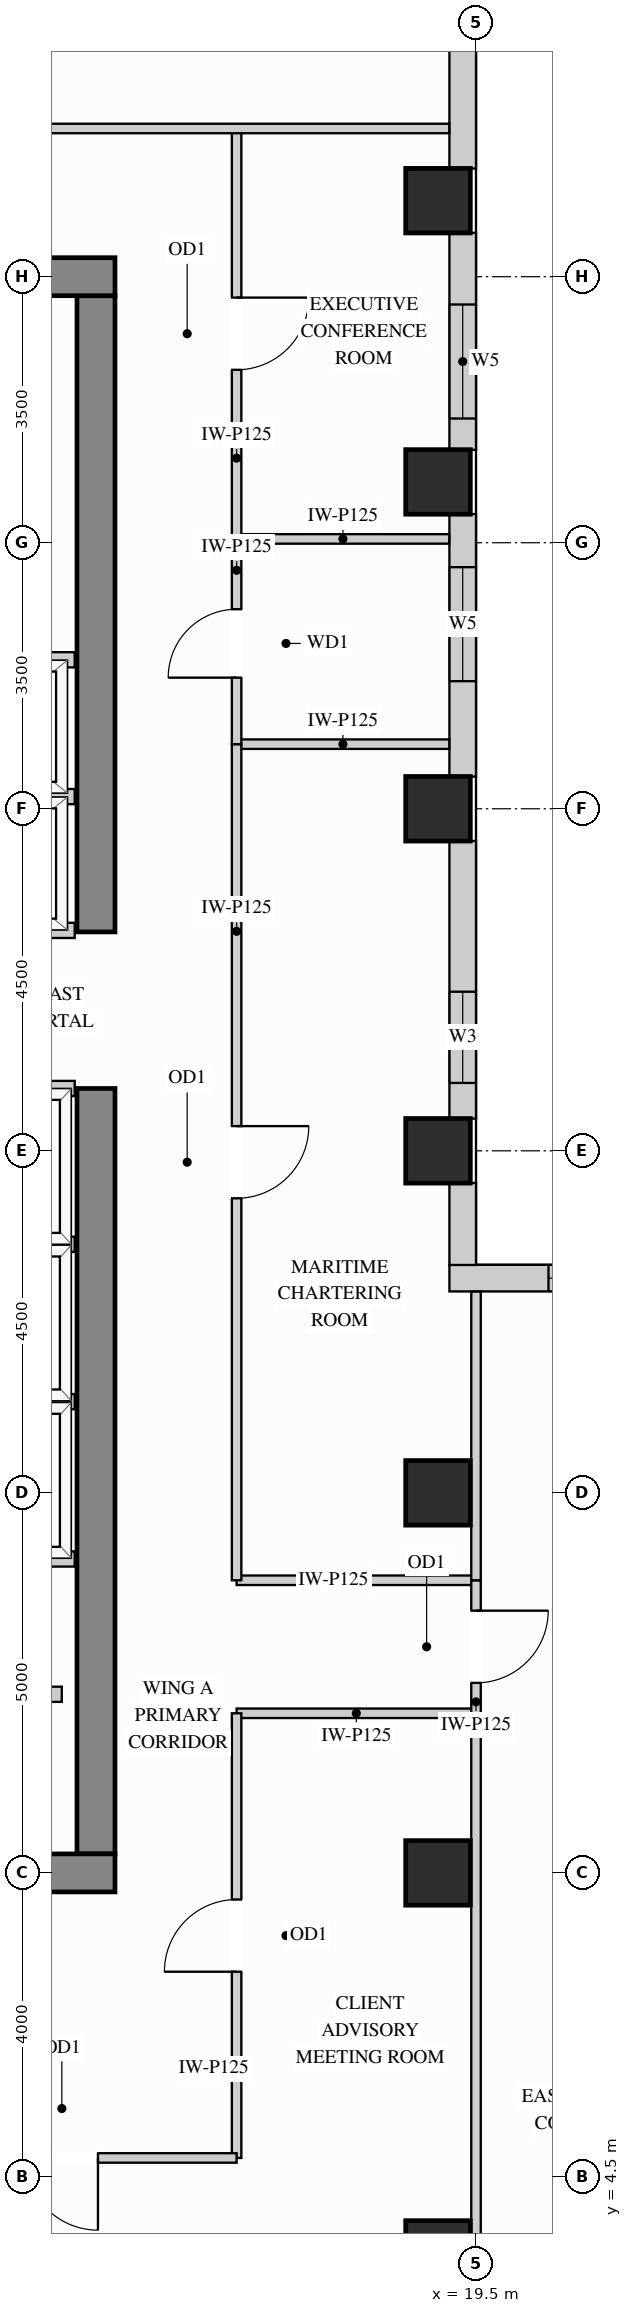
"""IFC4 building model, lengths in metres.
Left out: names, types, materials, properties, quantities, classifications, styles, units other than length and angle.
Written with IfcOpenShell. Run it as: python <this file> out.ifc"""

import sys

from ifc_helpers import new_model, si_unit, direction, frame, frame_2d, origin, origin_2d, place, context, subcontext, project, spatial, rectangle, extrude, source, transform, mapped, element, fill, save


model = new_model("IFC4")
c1 = context("Model", 3, precision=1e-05, world=origin(), true_north=direction((0.0, 1.0)))
c2 = subcontext(c1, "Body", "Model", "MODEL_VIEW")
j1 = project(units=[si_unit("LENGTHUNIT", "METRE"), si_unit("PLANEANGLEUNIT", "RADIAN")], contexts=[c1])
p1 = place(None, origin())
s1 = spatial("IfcSite", under=j1, at=p1, CompositionType="ELEMENT")
p2 = place(p1, origin())
s2 = spatial("IfcBuilding", under=s1, at=p2, CompositionType="ELEMENT")
p3 = place(p2, frame((0.0, 0.0, 270.0)))
s3 = spatial("IfcBuildingStorey", under=s2, at=p3, CompositionType="ELEMENT", Elevation=270.0)
m1 = source(origin(), c2, "Body", "SweptSolid", [
    extrude(rectangle(XDim=0.85, YDim=0.85, at=origin_2d()), origin(), (0.0, 0.0, 1.0), 3.4),
])
for number, where, z_axis, x_axis in (
    (1, (19.0, 13.5, 0.0), (0.0, 0.0, 1.0), (1.0, 0.0, 0.0)),
    (2, (19.0, 18.0, 0.0), (0.0, 0.0, 1.0), (1.0, 0.0, 0.0)),
    (3, (19.0, 22.5, 0.0), (0.0, 0.0, 1.0), (1.0, 0.0, 0.0)),
    (4, (19.0, 26.8, 0.0), (0.0, 0.0, 1.0), (1.0, 0.0, 0.0)),
    (5, (19.0, 30.5, 0.0), (0.0, 0.0, 1.0), (1.0, 0.0, 0.0)),
    (6, (19.0, 3.5, 0.0), (0.0, 0.0, 1.0), (1.0, 0.0, 0.0)),
    (7, (19.0, 8.5, 0.0), (0.0, 0.0, 1.0), (1.0, 0.0, 0.0)),
):
    element("IfcColumn", number, at=place(p3, frame(where, z_axis=z_axis, x_axis=x_axis)), inside=s3, PredefinedType="COLUMN", context=c2, shape_type="MappedRepresentation", body=[
        mapped(m1, transform((0.0, 0.0, 0.0), x_axis=(1.0, 0.0, 0.0), y_axis=(0.0, 1.0, 0.0), z_axis=(0.0, 0.0, 1.0))),
    ])
m2 = source(origin(), c2, "Body", "SweptSolid", [
    extrude(rectangle(XDim=10.07, YDim=0.5, at=frame_2d((5.035, 0.0))), origin(), (0.0, 0.0, 1.0), 3.4),
])
p4 = place(p3, frame((14.5, 8.75, 0.0), z_axis=(0.0, 0.0, 1.0), x_axis=(0.0, 1.0, 0.0)))
e8 = element("IfcWall", 8, at=p4, inside=s3, PredefinedType="SHEAR", context=c2, shape_type="MappedRepresentation", body=[
    mapped(m2, transform((0.0, 0.0, 0.0), x_axis=(1.0, 0.0, 0.0), y_axis=(0.0, 1.0, 0.0), z_axis=(0.0, 0.0, 1.0))),
])
m3 = source(origin(), c2, "Body", "SweptSolid", [
    extrude(rectangle(XDim=8.37, YDim=0.5, at=frame_2d((4.185, 0.0))), origin(), (0.0, 0.0, 1.0), 3.4),
])
p5 = place(p3, frame((14.5, 20.88, 0.0), z_axis=(0.0, 0.0, 1.0), x_axis=(0.0, 1.0, 0.0)))
e9 = element("IfcWall", 9, at=p5, inside=s3, PredefinedType="SHEAR", context=c2, shape_type="MappedRepresentation", body=[
    mapped(m3, transform((0.0, 0.0, 0.0), x_axis=(1.0, 0.0, 0.0), y_axis=(0.0, 1.0, 0.0), z_axis=(0.0, 0.0, 1.0))),
])
m4 = source(origin(), c2, "Body", "SweptSolid", [
    extrude(rectangle(XDim=10.5, YDim=0.5, at=frame_2d((5.25, 0.0))), origin(), (0.0, 0.0, 1.0), 3.4),
])
for number, where, z_axis, x_axis in (
    (10, (4.25, 29.5, 0.0), (0.0, 0.0, 1.0), (1.0, 0.0, 0.0)),
    (11, (4.25, 8.5, 0.0), (0.0, 0.0, 1.0), (1.0, 0.0, 0.0)),
):
    element("IfcWall", number, at=place(p3, frame(where, z_axis=z_axis, x_axis=x_axis)), inside=s3, PredefinedType="SHEAR", context=c2, shape_type="MappedRepresentation", body=[
        mapped(m4, transform((0.0, 0.0, 0.0), x_axis=(1.0, 0.0, 0.0), y_axis=(0.0, 1.0, 0.0), z_axis=(0.0, 0.0, 1.0))),
    ])
p6 = place(p3, frame((22.977, 16.325, 0.0), z_axis=(0.0, 0.0, 1.0), x_axis=(-1.0, 0.0, 0.0)))
e12 = element("IfcWall", 12, at=p6, inside=s3, PredefinedType="SOLIDWALL", context=c2, shape_type="SweptSolid", body=[
    extrude(rectangle(XDim=3.827, YDim=0.35, at=frame_2d((1.914, 0.0))), origin(), (0.0, 0.0, 1.0), 3.385),
])
p7 = place(p6, frame((1.023, 0.0, 0.78)))
e13 = element("IfcOpeningElement", 13, at=p7, cuts=e12, PredefinedType="OPENING", context=c2, shape_type="SweptSolid", body=[
    extrude(rectangle(XDim=1.5, YDim=2.0, at=frame_2d((0.75, 1.0))), frame((0.0, 0.185, 0.0), z_axis=(0.0, -1.0, 0.0), x_axis=(1.0, 0.0, 0.0)), (0.0, 0.0, 1.0), 0.37),
])
m5 = source(origin(), c2, "Body", "SweptSolid", [
    extrude(rectangle(XDim=1.079, YDim=0.35, at=frame_2d((0.54, 0.0))), origin(), (0.0, 0.0, 1.0), 2.619),
])
p8 = place(p3, frame((19.325, 16.498, 0.0), z_axis=(0.0, 0.0, 1.0), x_axis=(0.0, 1.0, 0.0)))
e14 = element("IfcWall", 14, at=p8, inside=s3, PredefinedType="SOLIDWALL", context=c2, shape_type="MappedRepresentation", body=[
    mapped(m5, transform((0.0, 0.0, 0.0), x_axis=(1.0, 0.0, 0.0), y_axis=(0.0, 1.0, 0.0), z_axis=(0.0, 0.0, 1.0))),
])
p9 = place(p3, frame((19.325, 18.423, 0.0), z_axis=(0.0, 0.0, 1.0), x_axis=(0.0, 1.0, 0.0)))
e15 = element("IfcWall", 15, at=p9, inside=s3, PredefinedType="SOLIDWALL", context=c2, shape_type="SweptSolid", body=[
    extrude(rectangle(XDim=3.654, YDim=0.35, at=frame_2d((1.827, 0.0))), origin(), (0.0, 0.0, 1.0), 2.619),
])
p10 = place(p9, frame((0.47, 0.0, 0.78)))
e16 = element("IfcOpeningElement", 16, at=p10, cuts=e15, PredefinedType="OPENING", context=c2, shape_type="SweptSolid", body=[
    extrude(rectangle(XDim=1.2, YDim=1.659, at=frame_2d((0.6, 0.83))), frame((0.0, 0.185, 0.0), z_axis=(0.0, -1.0, 0.0), x_axis=(1.0, 0.0, 0.0)), (0.0, 0.0, 1.0), 0.37),
])
p11 = place(p3, frame((19.325, 22.923, 0.0), z_axis=(0.0, 0.0, 1.0), x_axis=(0.0, 1.0, 0.0)))
e17 = element("IfcWall", 17, at=p11, inside=s3, PredefinedType="SOLIDWALL", context=c2, shape_type="SweptSolid", body=[
    extrude(rectangle(XDim=3.454, YDim=0.35, at=frame_2d((1.727, 0.0))), origin(), (0.0, 0.0, 1.0), 2.619),
])
p12 = place(p11, frame((1.256, 0.0, 0.78)))
e18 = element("IfcOpeningElement", 18, at=p12, cuts=e17, PredefinedType="OPENING", context=c2, shape_type="SweptSolid", body=[
    extrude(rectangle(XDim=1.5, YDim=1.659, at=frame_2d((0.75, 0.83))), frame((0.0, 0.185, 0.0), z_axis=(0.0, -1.0, 0.0), x_axis=(1.0, 0.0, 0.0)), (0.0, 0.0, 1.0), 0.37),
])
p13 = place(p3, frame((19.325, 27.223, 0.0), z_axis=(0.0, 0.0, 1.0), x_axis=(0.0, 1.0, 0.0)))
e19 = element("IfcWall", 19, at=p13, inside=s3, PredefinedType="SOLIDWALL", context=c2, shape_type="SweptSolid", body=[
    extrude(rectangle(XDim=2.854, YDim=0.35, at=frame_2d((1.427, 0.0))), origin(), (0.0, 0.0, 1.0), 2.619),
])
p14 = place(p13, frame((0.411, 0.0, 0.78)))
e20 = element("IfcOpeningElement", 20, at=p14, cuts=e19, PredefinedType="OPENING", context=c2, shape_type="SweptSolid", body=[
    extrude(rectangle(XDim=1.5, YDim=1.659, at=frame_2d((0.75, 0.83))), frame((0.0, 0.185, 0.0), z_axis=(0.0, -1.0, 0.0), x_axis=(1.0, 0.0, 0.0)), (0.0, 0.0, 1.0), 0.37),
])
m6 = source(origin(), c2, "Body", "SweptSolid", [
    extrude(rectangle(XDim=3.654, YDim=0.35, at=frame_2d((1.827, 0.0))), origin(), (0.0, 0.0, 1.0), 2.619),
])
p15 = place(p3, frame((19.325, 30.923, 0.0), z_axis=(0.0, 0.0, 1.0), x_axis=(0.0, 1.0, 0.0)))
e21 = element("IfcWall", 21, at=p15, inside=s3, PredefinedType="SOLIDWALL", context=c2, shape_type="MappedRepresentation", body=[
    mapped(m6, transform((0.0, 0.0, 0.0), x_axis=(1.0, 0.0, 0.0), y_axis=(0.0, 1.0, 0.0), z_axis=(0.0, 0.0, 1.0))),
])
m7 = source(origin(), c2, "Body", "SweptSolid", [
    extrude(rectangle(XDim=2.798, YDim=0.125, at=frame_2d((1.399, 0.0))), origin(), (0.0, 0.0, 1.0), 3.385),
])
for number, where, z_axis, x_axis in (
    (22, (16.35, 23.35, 0.0), (0.0, 0.0, 1.0), (1.0, 0.0, 0.0)),
    (23, (16.35, 26.05, 0.0), (0.0, 0.0, 1.0), (1.0, 0.0, 0.0)),
):
    element("IfcWall", number, at=place(p3, frame(where, z_axis=z_axis, x_axis=x_axis)), inside=s3, PredefinedType="PARTITIONING", context=c2, shape_type="MappedRepresentation", body=[
        mapped(m7, transform((0.0, 0.0, 0.0), x_axis=(1.0, 0.0, 0.0), y_axis=(0.0, 1.0, 0.0), z_axis=(0.0, 0.0, 1.0))),
    ])
m8 = source(origin(), c2, "Body", "SweptSolid", [
    extrude(rectangle(XDim=3.15, YDim=0.125, at=frame_2d((1.575, 0.0))), origin(), (0.0, 0.0, 1.0), 3.385),
])
for number, where, z_axis, x_axis in (
    (24, (16.35, 12.35, 0.0), (0.0, 0.0, 1.0), (1.0, 0.0, 0.0)),
    (25, (16.35, 10.6, 0.0), (0.0, 0.0, 1.0), (1.0, 0.0, 0.0)),
):
    element("IfcWall", number, at=place(p3, frame(where, z_axis=z_axis, x_axis=x_axis)), inside=s3, PredefinedType="PARTITIONING", context=c2, shape_type="MappedRepresentation", body=[
        mapped(m8, transform((0.0, 0.0, 0.0), x_axis=(1.0, 0.0, 0.0), y_axis=(0.0, 1.0, 0.0), z_axis=(0.0, 0.0, 1.0))),
    ])
p16 = place(p3, frame((16.35, 4.75, 0.0), z_axis=(0.0, 0.0, 1.0), x_axis=(0.0, 1.0, 0.0)))
e26 = element("IfcWall", 26, at=p16, inside=s3, PredefinedType="PARTITIONING", context=c2, shape_type="SweptSolid", body=[
    extrude(rectangle(XDim=5.85, YDim=0.125, at=frame_2d((2.925, 0.0))), origin(), (0.0, 0.0, 1.0), 3.385),
])
p17 = place(p16, frame((2.45, 0.0, 0.0)))
e27 = element("IfcOpeningElement", 27, at=p17, cuts=e26, PredefinedType="OPENING", context=c2, shape_type="SweptSolid", body=[
    extrude(rectangle(XDim=0.95, YDim=2.15, at=frame_2d((0.475, 1.075))), frame((0.0, 0.073, 0.0), z_axis=(0.0, -1.0, 0.0), x_axis=(1.0, 0.0, 0.0)), (0.0, 0.0, 1.0), 0.145),
])
p18 = place(p3, frame((16.35, 12.35, 0.0), z_axis=(0.0, 0.0, 1.0), x_axis=(0.0, 1.0, 0.0)))
e28 = element("IfcWall", 28, at=p18, inside=s3, PredefinedType="PARTITIONING", context=c2, shape_type="SweptSolid", body=[
    extrude(rectangle(XDim=11.0, YDim=0.125, at=frame_2d((5.5, 0.0))), origin(), (0.0, 0.0, 1.0), 3.385),
])
p19 = place(p18, frame((5.025, 0.0, 0.0)))
e29 = element("IfcOpeningElement", 29, at=p19, cuts=e28, PredefinedType="OPENING", context=c2, shape_type="SweptSolid", body=[
    extrude(rectangle(XDim=0.95, YDim=2.15, at=frame_2d((0.475, 1.075))), frame((0.0, 0.073, 0.0), z_axis=(0.0, -1.0, 0.0), x_axis=(1.0, 0.0, 0.0)), (0.0, 0.0, 1.0), 0.145),
])
p20 = place(p3, frame((16.35, 26.05, 0.0), z_axis=(0.0, 0.0, 1.0), x_axis=(0.0, 1.0, 0.0)))
e30 = element("IfcWall", 30, at=p20, inside=s3, PredefinedType="PARTITIONING", context=c2, shape_type="SweptSolid", body=[
    extrude(rectangle(XDim=5.4, YDim=0.125, at=frame_2d((2.7, 0.0))), origin(), (0.0, 0.0, 1.0), 3.385),
])
p21 = place(p20, frame((2.225, 0.0, 0.0)))
e31 = element("IfcOpeningElement", 31, at=p21, cuts=e30, PredefinedType="OPENING", context=c2, shape_type="SweptSolid", body=[
    extrude(rectangle(XDim=0.95, YDim=2.15, at=frame_2d((0.475, 1.075))), frame((0.0, 0.073, 0.0), z_axis=(0.0, -1.0, 0.0), x_axis=(1.0, 0.0, 0.0)), (0.0, 0.0, 1.0), 0.145),
])
p22 = place(p3, frame((16.35, 23.35, 0.0), z_axis=(0.0, 0.0, 1.0), x_axis=(0.0, 1.0, 0.0)))
e32 = element("IfcWall", 32, at=p22, inside=s3, PredefinedType="PARTITIONING", context=c2, shape_type="SweptSolid", body=[
    extrude(rectangle(XDim=2.7, YDim=0.125, at=frame_2d((1.35, 0.0))), origin(), (0.0, 0.0, 1.0), 3.385),
])
p23 = place(p22, frame((0.875, 0.0, 0.0)))
e33 = element("IfcOpeningElement", 33, at=p23, cuts=e32, PredefinedType="OPENING", context=c2, shape_type="SweptSolid", body=[
    extrude(rectangle(XDim=0.9, YDim=2.15, at=frame_2d((0.45, 1.075))), frame((0.0, 0.073, 0.0), z_axis=(0.0, -1.0, 0.0), x_axis=(1.0, 0.0, 0.0)), (0.0, 0.0, 1.0), 0.145),
])
m9 = source(origin(), c2, "Body", "SweptSolid", [
    extrude(rectangle(XDim=12.598, YDim=0.125, at=frame_2d((6.299, 0.0))), origin(), (0.0, 0.0, 1.0), 3.385),
])
p24 = place(p3, frame((6.55, 31.45, 0.0), z_axis=(0.0, 0.0, 1.0), x_axis=(1.0, 0.0, 0.0)))
e34 = element("IfcWall", 34, at=p24, inside=s3, PredefinedType="PARTITIONING", context=c2, shape_type="MappedRepresentation", body=[
    mapped(m9, transform((0.0, 0.0, 0.0), x_axis=(1.0, 0.0, 0.0), y_axis=(0.0, 1.0, 0.0), z_axis=(0.0, 0.0, 1.0))),
])
p25 = place(p3, frame((19.5, 10.6, 0.0), z_axis=(0.0, 0.0, 1.0), x_axis=(0.0, 1.0, 0.0)))
e35 = element("IfcWall", 35, at=p25, inside=s3, PredefinedType="PARTITIONING", context=c2, shape_type="SweptSolid", body=[
    extrude(rectangle(XDim=1.75, YDim=0.125, at=frame_2d((0.875, 0.0))), origin(), (0.0, 0.0, 1.0), 3.385),
])
p26 = place(p25, frame((0.4, 0.0, 0.0)))
e36 = element("IfcOpeningElement", 36, at=p26, cuts=e35, PredefinedType="OPENING", context=c2, shape_type="SweptSolid", body=[
    extrude(rectangle(XDim=0.95, YDim=2.15, at=frame_2d((0.475, 1.075))), frame((0.0, 0.073, 0.0), z_axis=(0.0, -1.0, 0.0), x_axis=(1.0, 0.0, 0.0)), (0.0, 0.0, 1.0), 0.145),
])
m10 = source(origin(), c2, "Body", "SweptSolid", [
    extrude(rectangle(XDim=10.248, YDim=0.125, at=frame_2d((5.124, 0.0))), origin(), (0.0, 0.0, 1.0), 3.385),
])
p27 = place(p3, frame((19.5, 0.352, 0.0), z_axis=(0.0, 0.0, 1.0), x_axis=(0.0, 1.0, 0.0)))
e37 = element("IfcWall", 37, at=p27, inside=s3, PredefinedType="PARTITIONING", context=c2, shape_type="MappedRepresentation", body=[
    mapped(m10, transform((0.0, 0.0, 0.0), x_axis=(1.0, 0.0, 0.0), y_axis=(0.0, 1.0, 0.0), z_axis=(0.0, 0.0, 1.0))),
])
m11 = source(origin(), c2, "Body", "SweptSolid", [
    extrude(rectangle(XDim=3.798, YDim=0.125, at=frame_2d((1.899, 0.0))), origin(), (0.0, 0.0, 1.0), 3.385),
])
p28 = place(p3, frame((19.5, 12.35, 0.0), z_axis=(0.0, 0.0, 1.0), x_axis=(0.0, 1.0, 0.0)))
e38 = element("IfcWall", 38, at=p28, inside=s3, PredefinedType="PARTITIONING", context=c2, shape_type="MappedRepresentation", body=[
    mapped(m11, transform((0.0, 0.0, 0.0), x_axis=(1.0, 0.0, 0.0), y_axis=(0.0, 1.0, 0.0), z_axis=(0.0, 0.0, 1.0))),
])
p29 = place(p3, frame((11.752, 4.75, 0.0), z_axis=(0.0, 0.0, 1.0), x_axis=(1.0, 0.0, 0.0)))
e39 = element("IfcWall", 39, at=p29, inside=s3, PredefinedType="PARTITIONING", context=c2, shape_type="SweptSolid", body=[
    extrude(rectangle(XDim=4.598, YDim=0.125, at=frame_2d((2.299, 0.0))), origin(), (0.0, 0.0, 1.0), 2.848),
])
p30 = place(p29, frame((1.824, 0.0, 0.0)))
e40 = element("IfcOpeningElement", 40, at=p30, cuts=e39, PredefinedType="OPENING", context=c2, shape_type="SweptSolid", body=[
    extrude(rectangle(XDim=0.95, YDim=2.15, at=frame_2d((0.475, 1.075))), frame((0.0, 0.073, 0.0), z_axis=(0.0, -1.0, 0.0), x_axis=(1.0, 0.0, 0.0)), (0.0, 0.0, 1.0), 0.145),
])
m12 = source(origin(), c2, "Body", "SweptSolid", [
    extrude(rectangle(XDim=1.63, YDim=0.2, at=frame_2d((0.815, 0.0))), origin(), (0.0, 0.0, 1.0), 3.385),
])
p31 = place(p3, frame((12.42, 10.85, 0.0), z_axis=(0.0, 0.0, 1.0), x_axis=(1.0, 0.0, 0.0)))
e41 = element("IfcWall", 41, at=p31, inside=s3, PredefinedType="PARTITIONING", context=c2, shape_type="MappedRepresentation", body=[
    mapped(m12, transform((0.0, 0.0, 0.0), x_axis=(1.0, 0.0, 0.0), y_axis=(0.0, 1.0, 0.0), z_axis=(0.0, 0.0, 1.0))),
])
m13 = source(origin(), c2, "Body", "SweptSolid", [
    extrude(rectangle(XDim=2.39, YDim=0.2, at=frame_2d((1.195, 0.0))), origin(), (0.0, 0.0, 1.0), 3.385),
])
for number, where, z_axis, x_axis in (
    (42, (11.83, 22.66, 0.0), (0.0, 0.0, 1.0), (1.0, 0.0, 0.0)),
    (43, (11.83, 20.9, 0.0), (0.0, 0.0, 1.0), (1.0, 0.0, 0.0)),
    (44, (11.83, 24.46, 0.0), (0.0, 0.0, 1.0), (1.0, 0.0, 0.0)),
):
    element("IfcWall", number, at=place(p3, frame(where, z_axis=z_axis, x_axis=x_axis)), inside=s3, PredefinedType="PARTITIONING", context=c2, shape_type="MappedRepresentation", body=[
        mapped(m13, transform((0.0, 0.0, 0.0), x_axis=(1.0, 0.0, 0.0), y_axis=(0.0, 1.0, 0.0), z_axis=(0.0, 0.0, 1.0))),
    ])
m14 = source(origin(), c2, "Body", "SweptSolid", [
    extrude(rectangle(XDim=1.99, YDim=0.2, at=frame_2d((0.995, 0.0))), origin(), (0.0, 0.0, 1.0), 3.385),
])
for number, where, z_axis, x_axis in (
    (45, (12.23, 14.7, 0.0), (0.0, 0.0, 1.0), (1.0, 0.0, 0.0)),
    (46, (12.23, 12.63, 0.0), (0.0, 0.0, 1.0), (1.0, 0.0, 0.0)),
    (47, (12.23, 16.77, 0.0), (0.0, 0.0, 1.0), (1.0, 0.0, 0.0)),
    (48, (12.23, 18.82, 0.0), (0.0, 0.0, 1.0), (1.0, 0.0, 0.0)),
):
    element("IfcWall", number, at=place(p3, frame(where, z_axis=z_axis, x_axis=x_axis)), inside=s3, PredefinedType="PARTITIONING", context=c2, shape_type="MappedRepresentation", body=[
        mapped(m14, transform((0.0, 0.0, 0.0), x_axis=(1.0, 0.0, 0.0), y_axis=(0.0, 1.0, 0.0), z_axis=(0.0, 0.0, 1.0))),
    ])
m15 = source(origin(), c2, "Body", "SweptSolid", [
    extrude(rectangle(XDim=0.95, YDim=2.15, at=frame_2d((0.475, 1.075))), frame((0.0, 0.025, 0.0), z_axis=(0.0, -1.0, 0.0), x_axis=(1.0, 0.0, 0.0)), (0.0, 0.0, 1.0), 0.05),
])
p32 = place(p17, origin())
e49 = element("IfcDoor", 49, at=p32, inside=s3, OperationType="SINGLE_SWING_LEFT", PredefinedType="DOOR", context=c2, shape_type="MappedRepresentation", body=[
    mapped(m15, transform((0.0, 0.0, 0.0), x_axis=(1.0, 0.0, 0.0), y_axis=(0.0, 1.0, 0.0), z_axis=(0.0, 0.0, 1.0))),
])
fill(e27, e49)
p33 = place(p19, origin())
e50 = element("IfcDoor", 50, at=p33, inside=s3, OperationType="SINGLE_SWING_RIGHT", PredefinedType="DOOR", context=c2, shape_type="MappedRepresentation", body=[
    mapped(m15, transform((0.0, 0.0, 0.0), x_axis=(1.0, 0.0, 0.0), y_axis=(0.0, 1.0, 0.0), z_axis=(0.0, 0.0, 1.0))),
])
fill(e29, e50)
p34 = place(p21, origin())
e51 = element("IfcDoor", 51, at=p34, inside=s3, OperationType="SINGLE_SWING_RIGHT", PredefinedType="DOOR", context=c2, shape_type="MappedRepresentation", body=[
    mapped(m15, transform((0.0, 0.0, 0.0), x_axis=(1.0, 0.0, 0.0), y_axis=(0.0, 1.0, 0.0), z_axis=(0.0, 0.0, 1.0))),
])
fill(e31, e51)
p35 = place(p30, origin())
e52 = element("IfcDoor", 52, at=p35, inside=s3, OperationType="SINGLE_SWING_RIGHT", PredefinedType="DOOR", context=c2, shape_type="MappedRepresentation", body=[
    mapped(m15, transform((0.0, 0.0, 0.0), x_axis=(1.0, 0.0, 0.0), y_axis=(0.0, 1.0, 0.0), z_axis=(0.0, 0.0, 1.0))),
])
fill(e40, e52)
p36 = place(p26, origin())
e53 = element("IfcDoor", 53, at=p36, inside=s3, OperationType="SINGLE_SWING_RIGHT", PredefinedType="DOOR", context=c2, shape_type="MappedRepresentation", body=[
    mapped(m15, transform((0.0, 0.0, 0.0), x_axis=(1.0, 0.0, 0.0), y_axis=(0.0, 1.0, 0.0), z_axis=(0.0, 0.0, 1.0))),
])
fill(e36, e53)
m16 = source(origin(), c2, "Body", "SweptSolid", [
    extrude(rectangle(XDim=0.9, YDim=2.15, at=frame_2d((0.45, 1.075))), frame((0.0, 0.025, 0.0), z_axis=(0.0, -1.0, 0.0), x_axis=(1.0, 0.0, 0.0)), (0.0, 0.0, 1.0), 0.05),
])
p37 = place(p23, origin())
e54 = element("IfcDoor", 54, at=p37, inside=s3, OperationType="SINGLE_SWING_LEFT", PredefinedType="DOOR", context=c2, shape_type="MappedRepresentation", body=[
    mapped(m16, transform((0.0, 0.0, 0.0), x_axis=(1.0, 0.0, 0.0), y_axis=(0.0, 1.0, 0.0), z_axis=(0.0, 0.0, 1.0))),
])
fill(e33, e54)
m17 = source(origin(), c2, "Body", "SweptSolid", [
    extrude(rectangle(XDim=1.2, YDim=1.659, at=frame_2d((0.6, 0.83))), frame((0.0, 0.03, 0.0), z_axis=(0.0, -1.0, 0.0), x_axis=(1.0, 0.0, 0.0)), (0.0, 0.0, 1.0), 0.06),
])
p38 = place(p10, origin())
e55 = element("IfcWindow", 55, at=p38, inside=s3, PartitioningType="SINGLE_PANEL", PredefinedType="WINDOW", context=c2, shape_type="MappedRepresentation", body=[
    mapped(m17, transform((0.0, 0.0, 0.0), x_axis=(1.0, 0.0, 0.0), y_axis=(0.0, 1.0, 0.0), z_axis=(0.0, 0.0, 1.0))),
])
fill(e16, e55)
m18 = source(origin(), c2, "Body", "SweptSolid", [
    extrude(rectangle(XDim=1.5, YDim=2.0, at=frame_2d((0.75, 1.0))), frame((0.0, 0.03, 0.0), z_axis=(0.0, -1.0, 0.0), x_axis=(1.0, 0.0, 0.0)), (0.0, 0.0, 1.0), 0.06),
])
p39 = place(p7, origin())
e56 = element("IfcWindow", 56, at=p39, inside=s3, PartitioningType="SINGLE_PANEL", PredefinedType="WINDOW", context=c2, shape_type="MappedRepresentation", body=[
    mapped(m18, transform((0.0, 0.0, 0.0), x_axis=(1.0, 0.0, 0.0), y_axis=(0.0, 1.0, 0.0), z_axis=(0.0, 0.0, 1.0))),
])
fill(e13, e56)
m19 = source(origin(), c2, "Body", "SweptSolid", [
    extrude(rectangle(XDim=1.5, YDim=1.659, at=frame_2d((0.75, 0.83))), frame((0.0, 0.03, 0.0), z_axis=(0.0, -1.0, 0.0), x_axis=(1.0, 0.0, 0.0)), (0.0, 0.0, 1.0), 0.06),
])
p40 = place(p12, origin())
e57 = element("IfcWindow", 57, at=p40, inside=s3, PartitioningType="SINGLE_PANEL", PredefinedType="WINDOW", context=c2, shape_type="MappedRepresentation", body=[
    mapped(m19, transform((0.0, 0.0, 0.0), x_axis=(1.0, 0.0, 0.0), y_axis=(0.0, 1.0, 0.0), z_axis=(0.0, 0.0, 1.0))),
])
fill(e18, e57)
p41 = place(p14, origin())
e58 = element("IfcWindow", 58, at=p41, inside=s3, PartitioningType="SINGLE_PANEL", PredefinedType="WINDOW", context=c2, shape_type="MappedRepresentation", body=[
    mapped(m19, transform((0.0, 0.0, 0.0), x_axis=(1.0, 0.0, 0.0), y_axis=(0.0, 1.0, 0.0), z_axis=(0.0, 0.0, 1.0))),
])
fill(e20, e58)
save(model, sys.argv[1])
